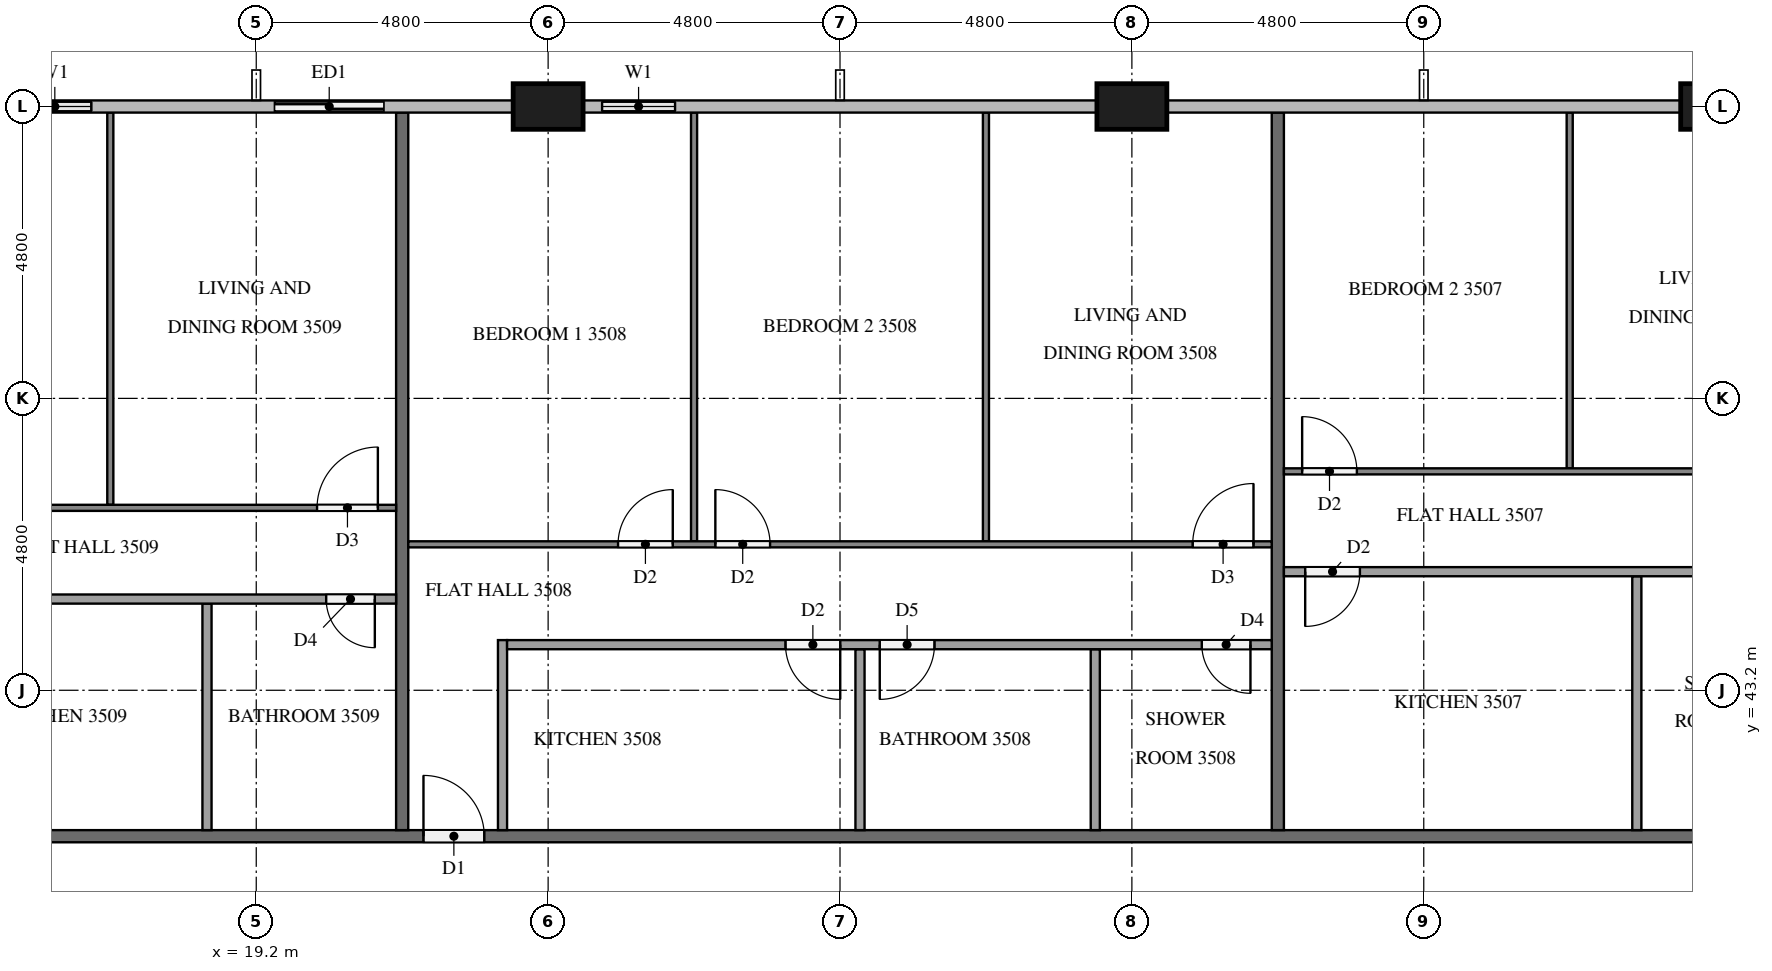
"""IFC4 building model, lengths in metres.
Left out: names, types, materials, properties, quantities, classifications, styles, units other than length and angle.
Written with IfcOpenShell. Run it as: python <this file> out.ifc"""

import sys

from ifc_helpers import new_model, si_unit, direction, frame, frame_2d, origin, origin_2d, place, context, subcontext, project, spatial, rectangle, extrude, element, fill, save


model = new_model("IFC4")
c1 = context("Model", 3, precision=1e-05, world=origin(), true_north=direction((0.0, 1.0)))
c2 = subcontext(c1, "Body", "Model", "MODEL_VIEW")
j1 = project(units=[si_unit("LENGTHUNIT", "METRE"), si_unit("PLANEANGLEUNIT", "RADIAN")], contexts=[c1])
p1 = place(None, origin())
s1 = spatial("IfcSite", under=j1, at=p1, CompositionType="ELEMENT")
p2 = place(p1, origin())
s2 = spatial("IfcBuilding", under=s1, at=p2, CompositionType="ELEMENT")
p3 = place(p2, frame((0.0, 0.0, 136.6)))
s3 = spatial("IfcBuildingStorey", under=s2, at=p3, CompositionType="ELEMENT", Elevation=136.6)
for number, where, z_axis, x_axis in (
    (1, (43.2, 52.8, 0.0), (0.0, 0.0, 1.0), (1.0, 0.0, 0.0)),
    (2, (33.6, 52.8, 0.0), (0.0, 0.0, 1.0), (1.0, 0.0, 0.0)),
    (3, (24.0, 52.8, 0.0), (0.0, 0.0, 1.0), (1.0, 0.0, 0.0)),
):
    element("IfcColumn", number, at=place(p3, frame(where, z_axis=z_axis, x_axis=x_axis)), inside=s3, PredefinedType="COLUMN", context=c2, shape_type="SweptSolid", body=[
        extrude(rectangle(XDim=1.15, YDim=0.75, at=origin_2d()), origin(), (0.0, 0.0, 1.0), 3.2),
    ])
p4 = place(p3, frame((26.4, 52.8, 0.0), z_axis=(0.0, 0.0, 1.0), x_axis=(-1.0, 0.0, 0.0)))
e4 = element("IfcWall", 4, at=p4, inside=s3, PredefinedType="SOLIDWALL", context=c2, shape_type="SweptSolid", body=[
    extrude(rectangle(XDim=1.825, YDim=0.15, at=frame_2d((0.913, 0.0))), origin(), (0.0, 0.0, 1.0), 3.2),
])
p5 = place(p4, frame((0.312, 0.0, 0.9)))
e5 = element("IfcOpeningElement", 5, at=p5, cuts=e4, PredefinedType="OPENING", context=c2, shape_type="SweptSolid", body=[
    extrude(rectangle(XDim=1.2, YDim=1.4, at=frame_2d((0.6, 0.7))), frame((0.0, 0.085, 0.0), z_axis=(0.0, -1.0, 0.0), x_axis=(1.0, 0.0, 0.0)), (0.0, 0.0, 1.0), 0.17),
])
p6 = place(p3, frame((21.6, 52.8, 0.0), z_axis=(0.0, 0.0, 1.0), x_axis=(-1.0, 0.0, 0.0)))
e6 = element("IfcWall", 6, at=p6, inside=s3, PredefinedType="SOLIDWALL", context=c2, shape_type="SweptSolid", body=[
    extrude(rectangle(XDim=2.4, YDim=0.15, at=frame_2d((1.2, 0.0))), origin(), (0.0, 0.0, 1.0), 3.2),
])
p7 = place(p6, frame((0.3, 0.0, 0.0)))
e7 = element("IfcOpeningElement", 7, at=p7, cuts=e6, PredefinedType="OPENING", context=c2, shape_type="SweptSolid", body=[
    extrude(rectangle(XDim=1.8, YDim=2.4, at=frame_2d((0.9, 1.2))), frame((0.0, 0.085, 0.0), z_axis=(0.0, -1.0, 0.0), x_axis=(1.0, 0.0, 0.0)), (0.0, 0.0, 1.0), 0.17),
])
p8 = place(p3, frame((16.8, 52.8, 0.0), z_axis=(0.0, 0.0, 1.0), x_axis=(-1.0, 0.0, 0.0)))
e8 = element("IfcWall", 8, at=p8, inside=s3, PredefinedType="SOLIDWALL", context=c2, shape_type="SweptSolid", body=[
    extrude(rectangle(XDim=1.825, YDim=0.15, at=frame_2d((0.913, 0.0))), origin(), (0.0, 0.0, 1.0), 3.2),
])
p9 = place(p8, frame((0.312, 0.0, 0.9)))
e9 = element("IfcOpeningElement", 9, at=p9, cuts=e8, PredefinedType="OPENING", context=c2, shape_type="SweptSolid", body=[
    extrude(rectangle(XDim=1.2, YDim=1.4, at=frame_2d((0.6, 0.7))), frame((0.0, 0.085, 0.0), z_axis=(0.0, -1.0, 0.0), x_axis=(1.0, 0.0, 0.0)), (0.0, 0.0, 1.0), 0.17),
])
p10 = place(p3, frame((11.9, 40.8, 0.0), z_axis=(0.0, 0.0, 1.0), x_axis=(1.0, 0.0, 0.0)))
e10 = element("IfcWall", 10, at=p10, inside=s3, PredefinedType="PARTITIONING", context=c2, shape_type="SweptSolid", body=[
    extrude(rectangle(XDim=38.6, YDim=0.2, at=frame_2d((19.3, 0.0))), origin(), (0.0, 0.0, 1.0), 3.2),
])
p11 = place(p10, frame((37.15, 0.0, 0.0)))
e11 = element("IfcOpeningElement", 11, at=p11, cuts=e10, PredefinedType="OPENING", context=c2, shape_type="SweptSolid", body=[
    extrude(rectangle(XDim=1.0, YDim=2.1, at=frame_2d((0.5, 1.05))), frame((0.0, 0.11, 0.0), z_axis=(0.0, -1.0, 0.0), x_axis=(1.0, 0.0, 0.0)), (0.0, 0.0, 1.0), 0.22),
])
p12 = place(p10, frame((10.05, 0.0, 0.0)))
e12 = element("IfcOpeningElement", 12, at=p12, cuts=e10, PredefinedType="OPENING", context=c2, shape_type="SweptSolid", body=[
    extrude(rectangle(XDim=1.0, YDim=2.1, at=frame_2d((0.5, 1.05))), frame((0.0, 0.11, 0.0), z_axis=(0.0, -1.0, 0.0), x_axis=(1.0, 0.0, 0.0)), (0.0, 0.0, 1.0), 0.22),
])
p13 = place(p10, frame((0.45, 0.0, 0.0)))
e13 = element("IfcOpeningElement", 13, at=p13, cuts=e10, PredefinedType="OPENING", context=c2, shape_type="SweptSolid", body=[
    extrude(rectangle(XDim=1.0, YDim=2.1, at=frame_2d((0.5, 1.05))), frame((0.0, 0.11, 0.0), z_axis=(0.0, -1.0, 0.0), x_axis=(1.0, 0.0, 0.0)), (0.0, 0.0, 1.0), 0.22),
])
for number, where, z_axis, x_axis in (
    (14, (36.0, 52.7, 0.0), (0.0, 0.0, 1.0), (0.0, -1.0, 0.0)),
    (15, (21.6, 52.7, 0.0), (0.0, 0.0, 1.0), (0.0, -1.0, 0.0)),
):
    element("IfcWall", number, at=place(p3, frame(where, z_axis=z_axis, x_axis=x_axis)), inside=s3, PredefinedType="PARTITIONING", context=c2, shape_type="SweptSolid", body=[
        extrude(rectangle(XDim=11.8, YDim=0.2, at=frame_2d((5.9, 0.0))), origin(), (0.0, 0.0, 1.0), 3.2),
    ])
p14 = place(p3, frame((40.8, 46.85, 0.0), z_axis=(0.0, 0.0, 1.0), x_axis=(0.0, 1.0, 0.0)))
e16 = element("IfcWall", 16, at=p14, inside=s3, PredefinedType="PARTITIONING", context=c2, shape_type="SweptSolid", body=[
    extrude(rectangle(XDim=5.85, YDim=0.1, at=frame_2d((2.925, 0.0))), origin(), (0.0, 0.0, 1.0), 3.2),
])
p15 = place(p3, frame((36.1, 46.8, 0.0), z_axis=(0.0, 0.0, 1.0), x_axis=(1.0, 0.0, 0.0)))
e17 = element("IfcWall", 17, at=p15, inside=s3, PredefinedType="PARTITIONING", context=c2, shape_type="SweptSolid", body=[
    extrude(rectangle(XDim=14.2, YDim=0.1, at=frame_2d((7.1, 0.0))), origin(), (0.0, 0.0, 1.0), 3.2),
])
p16 = place(p15, frame((9.85, 0.0, 0.0)))
e18 = element("IfcOpeningElement", 18, at=p16, cuts=e17, PredefinedType="OPENING", context=c2, shape_type="SweptSolid", body=[
    extrude(rectangle(XDim=0.9, YDim=2.1, at=frame_2d((0.45, 1.05))), frame((0.0, 0.06, 0.0), z_axis=(0.0, -1.0, 0.0), x_axis=(1.0, 0.0, 0.0)), (0.0, 0.0, 1.0), 0.12),
])
p17 = place(p15, frame((8.15, 0.0, 0.0)))
e19 = element("IfcOpeningElement", 19, at=p17, cuts=e17, PredefinedType="OPENING", context=c2, shape_type="SweptSolid", body=[
    extrude(rectangle(XDim=1.0, YDim=2.1, at=frame_2d((0.5, 1.05))), frame((0.0, 0.06, 0.0), z_axis=(0.0, -1.0, 0.0), x_axis=(1.0, 0.0, 0.0)), (0.0, 0.0, 1.0), 0.12),
])
p18 = place(p15, frame((0.3, 0.0, 0.0)))
e20 = element("IfcOpeningElement", 20, at=p18, cuts=e17, PredefinedType="OPENING", context=c2, shape_type="SweptSolid", body=[
    extrude(rectangle(XDim=0.9, YDim=2.1, at=frame_2d((0.45, 1.05))), frame((0.0, 0.06, 0.0), z_axis=(0.0, -1.0, 0.0), x_axis=(1.0, 0.0, 0.0)), (0.0, 0.0, 1.0), 0.12),
])
p19 = place(p3, frame((41.904, 40.9, 0.0), z_axis=(0.0, 0.0, 1.0), x_axis=(0.0, 1.0, 0.0)))
e21 = element("IfcWall", 21, at=p19, inside=s3, PredefinedType="PARTITIONING", context=c2, shape_type="SweptSolid", body=[
    extrude(rectangle(XDim=4.175, YDim=0.15, at=frame_2d((2.087, 0.0))), origin(), (0.0, 0.0, 1.0), 3.2),
])
p20 = place(p3, frame((48.675, 45.15, 0.0), z_axis=(0.0, 0.0, 1.0), x_axis=(-1.0, 0.0, 0.0)))
e22 = element("IfcWall", 22, at=p20, inside=s3, PredefinedType="PARTITIONING", context=c2, shape_type="SweptSolid", body=[
    extrude(rectangle(XDim=12.575, YDim=0.15, at=frame_2d((6.288, 0.0))), origin(), (0.0, 0.0, 1.0), 3.2),
])
p21 = place(p20, frame((2.644, 0.0, 0.0)))
e23 = element("IfcOpeningElement", 23, at=p21, cuts=e22, PredefinedType="OPENING", context=c2, shape_type="SweptSolid", body=[
    extrude(rectangle(XDim=0.9, YDim=2.1, at=frame_2d((0.45, 1.05))), frame((0.0, 0.085, 0.0), z_axis=(0.0, -1.0, 0.0), x_axis=(1.0, 0.0, 0.0)), (0.0, 0.0, 1.0), 0.17),
])
p22 = place(p20, frame((4.194, 0.0, 0.0)))
e24 = element("IfcOpeningElement", 24, at=p22, cuts=e22, PredefinedType="OPENING", context=c2, shape_type="SweptSolid", body=[
    extrude(rectangle(XDim=0.8, YDim=2.1, at=frame_2d((0.4, 1.05))), frame((0.0, 0.085, 0.0), z_axis=(0.0, -1.0, 0.0), x_axis=(1.0, 0.0, 0.0)), (0.0, 0.0, 1.0), 0.17),
])
p23 = place(p20, frame((11.325, 0.0, 0.0)))
e25 = element("IfcOpeningElement", 25, at=p23, cuts=e22, PredefinedType="OPENING", context=c2, shape_type="SweptSolid", body=[
    extrude(rectangle(XDim=0.9, YDim=2.1, at=frame_2d((0.45, 1.05))), frame((0.0, 0.085, 0.0), z_axis=(0.0, -1.0, 0.0), x_axis=(1.0, 0.0, 0.0)), (0.0, 0.0, 1.0), 0.17),
])
for number, where, z_axis, x_axis in (
    (26, (26.4, 45.65, 0.0), (0.0, 0.0, 1.0), (0.0, 1.0, 0.0)),
    (27, (31.2, 45.65, 0.0), (0.0, 0.0, 1.0), (0.0, 1.0, 0.0)),
):
    element("IfcWall", number, at=place(p3, frame(where, z_axis=z_axis, x_axis=x_axis)), inside=s3, PredefinedType="PARTITIONING", context=c2, shape_type="SweptSolid", body=[
        extrude(rectangle(XDim=7.05, YDim=0.1, at=frame_2d((3.525, 0.0))), origin(), (0.0, 0.0, 1.0), 3.2),
    ])
p24 = place(p3, frame((21.7, 45.6, 0.0), z_axis=(0.0, 0.0, 1.0), x_axis=(1.0, 0.0, 0.0)))
e28 = element("IfcWall", 28, at=p24, inside=s3, PredefinedType="PARTITIONING", context=c2, shape_type="SweptSolid", body=[
    extrude(rectangle(XDim=14.2, YDim=0.1, at=frame_2d((7.1, 0.0))), origin(), (0.0, 0.0, 1.0), 3.2),
])
p25 = place(p24, frame((3.45, 0.0, 0.0)))
e29 = element("IfcOpeningElement", 29, at=p25, cuts=e28, PredefinedType="OPENING", context=c2, shape_type="SweptSolid", body=[
    extrude(rectangle(XDim=0.9, YDim=2.1, at=frame_2d((0.45, 1.05))), frame((0.0, 0.06, 0.0), z_axis=(0.0, -1.0, 0.0), x_axis=(1.0, 0.0, 0.0)), (0.0, 0.0, 1.0), 0.12),
])
p26 = place(p24, frame((5.05, 0.0, 0.0)))
e30 = element("IfcOpeningElement", 30, at=p26, cuts=e28, PredefinedType="OPENING", context=c2, shape_type="SweptSolid", body=[
    extrude(rectangle(XDim=0.9, YDim=2.1, at=frame_2d((0.45, 1.05))), frame((0.0, 0.06, 0.0), z_axis=(0.0, -1.0, 0.0), x_axis=(1.0, 0.0, 0.0)), (0.0, 0.0, 1.0), 0.12),
])
p27 = place(p24, frame((12.9, 0.0, 0.0)))
e31 = element("IfcOpeningElement", 31, at=p27, cuts=e28, PredefinedType="OPENING", context=c2, shape_type="SweptSolid", body=[
    extrude(rectangle(XDim=1.0, YDim=2.1, at=frame_2d((0.5, 1.05))), frame((0.0, 0.06, 0.0), z_axis=(0.0, -1.0, 0.0), x_axis=(1.0, 0.0, 0.0)), (0.0, 0.0, 1.0), 0.12),
])
for number, where, z_axis, x_axis in (
    (32, (29.129, 40.9, 0.0), (0.0, 0.0, 1.0), (0.0, 1.0, 0.0)),
    (33, (32.998, 40.9, 0.0), (0.0, 0.0, 1.0), (0.0, 1.0, 0.0)),
):
    element("IfcWall", number, at=place(p3, frame(where, z_axis=z_axis, x_axis=x_axis)), inside=s3, PredefinedType="PARTITIONING", context=c2, shape_type="SweptSolid", body=[
        extrude(rectangle(XDim=2.975, YDim=0.15, at=frame_2d((1.488, 0.0))), origin(), (0.0, 0.0, 1.0), 3.2),
    ])
p28 = place(p3, frame((23.25, 40.9, 0.0), z_axis=(0.0, 0.0, 1.0), x_axis=(0.0, 1.0, 0.0)))
e34 = element("IfcWall", 34, at=p28, inside=s3, PredefinedType="PARTITIONING", context=c2, shape_type="SweptSolid", body=[
    extrude(rectangle(XDim=3.125, YDim=0.15, at=frame_2d((1.562, 0.0))), origin(), (0.0, 0.0, 1.0), 3.2),
])
p29 = place(p3, frame((35.9, 43.95, 0.0), z_axis=(0.0, 0.0, 1.0), x_axis=(-1.0, 0.0, 0.0)))
e35 = element("IfcWall", 35, at=p29, inside=s3, PredefinedType="PARTITIONING", context=c2, shape_type="SweptSolid", body=[
    extrude(rectangle(XDim=12.575, YDim=0.15, at=frame_2d((6.288, 0.0))), origin(), (0.0, 0.0, 1.0), 3.2),
])
p30 = place(p29, frame((7.096, 0.0, 0.0)))
e36 = element("IfcOpeningElement", 36, at=p30, cuts=e35, PredefinedType="OPENING", context=c2, shape_type="SweptSolid", body=[
    extrude(rectangle(XDim=0.9, YDim=2.1, at=frame_2d((0.45, 1.05))), frame((0.0, 0.085, 0.0), z_axis=(0.0, -1.0, 0.0), x_axis=(1.0, 0.0, 0.0)), (0.0, 0.0, 1.0), 0.17),
])
p31 = place(p29, frame((5.546, 0.0, 0.0)))
e37 = element("IfcOpeningElement", 37, at=p31, cuts=e35, PredefinedType="OPENING", context=c2, shape_type="SweptSolid", body=[
    extrude(rectangle(XDim=0.9, YDim=2.1, at=frame_2d((0.45, 1.05))), frame((0.0, 0.085, 0.0), z_axis=(0.0, -1.0, 0.0), x_axis=(1.0, 0.0, 0.0)), (0.0, 0.0, 1.0), 0.17),
])
p32 = place(p29, frame((0.35, 0.0, 0.0)))
e38 = element("IfcOpeningElement", 38, at=p32, cuts=e35, PredefinedType="OPENING", context=c2, shape_type="SweptSolid", body=[
    extrude(rectangle(XDim=0.8, YDim=2.1, at=frame_2d((0.4, 1.05))), frame((0.0, 0.085, 0.0), z_axis=(0.0, -1.0, 0.0), x_axis=(1.0, 0.0, 0.0)), (0.0, 0.0, 1.0), 0.17),
])
p33 = place(p3, frame((16.8, 46.25, 0.0), z_axis=(0.0, 0.0, 1.0), x_axis=(0.0, 1.0, 0.0)))
e39 = element("IfcWall", 39, at=p33, inside=s3, PredefinedType="PARTITIONING", context=c2, shape_type="SweptSolid", body=[
    extrude(rectangle(XDim=6.45, YDim=0.1, at=frame_2d((3.225, 0.0))), origin(), (0.0, 0.0, 1.0), 3.2),
])
p34 = place(p3, frame((12.1, 46.2, 0.0), z_axis=(0.0, 0.0, 1.0), x_axis=(1.0, 0.0, 0.0)))
e40 = element("IfcWall", 40, at=p34, inside=s3, PredefinedType="PARTITIONING", context=c2, shape_type="SweptSolid", body=[
    extrude(rectangle(XDim=9.4, YDim=0.1, at=frame_2d((4.7, 0.0))), origin(), (0.0, 0.0, 1.0), 3.2),
])
p35 = place(p34, frame((0.3, 0.0, 0.0)))
e41 = element("IfcOpeningElement", 41, at=p35, cuts=e40, PredefinedType="OPENING", context=c2, shape_type="SweptSolid", body=[
    extrude(rectangle(XDim=0.9, YDim=2.1, at=frame_2d((0.45, 1.05))), frame((0.0, 0.06, 0.0), z_axis=(0.0, -1.0, 0.0), x_axis=(1.0, 0.0, 0.0)), (0.0, 0.0, 1.0), 0.12),
])
p36 = place(p34, frame((8.1, 0.0, 0.0)))
e42 = element("IfcOpeningElement", 42, at=p36, cuts=e40, PredefinedType="OPENING", context=c2, shape_type="SweptSolid", body=[
    extrude(rectangle(XDim=1.0, YDim=2.1, at=frame_2d((0.5, 1.05))), frame((0.0, 0.06, 0.0), z_axis=(0.0, -1.0, 0.0), x_axis=(1.0, 0.0, 0.0)), (0.0, 0.0, 1.0), 0.12),
])
p37 = place(p3, frame((18.39, 40.9, 0.0), z_axis=(0.0, 0.0, 1.0), x_axis=(0.0, 1.0, 0.0)))
e43 = element("IfcWall", 43, at=p37, inside=s3, PredefinedType="PARTITIONING", context=c2, shape_type="SweptSolid", body=[
    extrude(rectangle(XDim=3.725, YDim=0.15, at=frame_2d((1.863, 0.0))), origin(), (0.0, 0.0, 1.0), 3.2),
])
p38 = place(p3, frame((21.5, 44.7, 0.0), z_axis=(0.0, 0.0, 1.0), x_axis=(-1.0, 0.0, 0.0)))
e44 = element("IfcWall", 44, at=p38, inside=s3, PredefinedType="PARTITIONING", context=c2, shape_type="SweptSolid", body=[
    extrude(rectangle(XDim=7.775, YDim=0.15, at=frame_2d((3.887, 0.0))), origin(), (0.0, 0.0, 1.0), 3.2),
])
p39 = place(p38, frame((6.575, 0.0, 0.0)))
e45 = element("IfcOpeningElement", 45, at=p39, cuts=e44, PredefinedType="OPENING", context=c2, shape_type="SweptSolid", body=[
    extrude(rectangle(XDim=0.9, YDim=2.1, at=frame_2d((0.45, 1.05))), frame((0.0, 0.085, 0.0), z_axis=(0.0, -1.0, 0.0), x_axis=(1.0, 0.0, 0.0)), (0.0, 0.0, 1.0), 0.17),
])
p40 = place(p38, frame((0.35, 0.0, 0.0)))
e46 = element("IfcOpeningElement", 46, at=p40, cuts=e44, PredefinedType="OPENING", context=c2, shape_type="SweptSolid", body=[
    extrude(rectangle(XDim=0.8, YDim=2.1, at=frame_2d((0.4, 1.05))), frame((0.0, 0.085, 0.0), z_axis=(0.0, -1.0, 0.0), x_axis=(1.0, 0.0, 0.0)), (0.0, 0.0, 1.0), 0.17),
])
p41 = place(p5, origin())
e47 = element("IfcWindow", 47, at=p41, inside=s3, PartitioningType="SINGLE_PANEL", PredefinedType="WINDOW", context=c2, shape_type="SweptSolid", body=[
    extrude(rectangle(XDim=1.2, YDim=1.4, at=frame_2d((0.6, 0.7))), frame((0.0, 0.03, 0.0), z_axis=(0.0, -1.0, 0.0), x_axis=(1.0, 0.0, 0.0)), (0.0, 0.0, 1.0), 0.06),
])
fill(e5, e47)
p42 = place(p7, origin())
e48 = element("IfcDoor", 48, at=p42, inside=s3, OperationType="SLIDING_TO_RIGHT", PredefinedType="DOOR", context=c2, shape_type="SweptSolid", body=[
    extrude(rectangle(XDim=1.8, YDim=2.4, at=frame_2d((0.9, 1.2))), frame((0.0, 0.025, 0.0), z_axis=(0.0, -1.0, 0.0), x_axis=(1.0, 0.0, 0.0)), (0.0, 0.0, 1.0), 0.05),
])
fill(e7, e48)
p43 = place(p9, origin())
e49 = element("IfcWindow", 49, at=p43, inside=s3, PartitioningType="SINGLE_PANEL", PredefinedType="WINDOW", context=c2, shape_type="SweptSolid", body=[
    extrude(rectangle(XDim=1.2, YDim=1.4, at=frame_2d((0.6, 0.7))), frame((0.0, 0.03, 0.0), z_axis=(0.0, -1.0, 0.0), x_axis=(1.0, 0.0, 0.0)), (0.0, 0.0, 1.0), 0.06),
])
fill(e9, e49)
p44 = place(p12, origin())
e50 = element("IfcDoor", 50, at=p44, inside=s3, OperationType="SINGLE_SWING_LEFT", PredefinedType="DOOR", context=c2, shape_type="SweptSolid", body=[
    extrude(rectangle(XDim=1.0, YDim=2.1, at=frame_2d((0.5, 1.05))), frame((0.0, 0.025, 0.0), z_axis=(0.0, -1.0, 0.0), x_axis=(1.0, 0.0, 0.0)), (0.0, 0.0, 1.0), 0.05),
])
fill(e12, e50)
p45 = place(p18, origin())
e51 = element("IfcDoor", 51, at=p45, inside=s3, OperationType="SINGLE_SWING_LEFT", PredefinedType="DOOR", context=c2, shape_type="SweptSolid", body=[
    extrude(rectangle(XDim=0.9, YDim=2.1, at=frame_2d((0.45, 1.05))), frame((0.0, 0.025, 0.0), z_axis=(0.0, -1.0, 0.0), x_axis=(1.0, 0.0, 0.0)), (0.0, 0.0, 1.0), 0.05),
])
fill(e20, e51)
p46 = place(p23, origin())
e52 = element("IfcDoor", 52, at=p46, inside=s3, OperationType="SINGLE_SWING_RIGHT", PredefinedType="DOOR", context=c2, shape_type="SweptSolid", body=[
    extrude(rectangle(XDim=0.9, YDim=2.1, at=frame_2d((0.45, 1.05))), frame((0.0, 0.025, 0.0), z_axis=(0.0, -1.0, 0.0), x_axis=(1.0, 0.0, 0.0)), (0.0, 0.0, 1.0), 0.05),
])
fill(e25, e52)
p47 = place(p25, origin())
e53 = element("IfcDoor", 53, at=p47, inside=s3, OperationType="SINGLE_SWING_RIGHT", PredefinedType="DOOR", context=c2, shape_type="SweptSolid", body=[
    extrude(rectangle(XDim=0.9, YDim=2.1, at=frame_2d((0.45, 1.05))), frame((0.0, 0.025, 0.0), z_axis=(0.0, -1.0, 0.0), x_axis=(1.0, 0.0, 0.0)), (0.0, 0.0, 1.0), 0.05),
])
fill(e29, e53)
p48 = place(p26, origin())
e54 = element("IfcDoor", 54, at=p48, inside=s3, OperationType="SINGLE_SWING_LEFT", PredefinedType="DOOR", context=c2, shape_type="SweptSolid", body=[
    extrude(rectangle(XDim=0.9, YDim=2.1, at=frame_2d((0.45, 1.05))), frame((0.0, 0.025, 0.0), z_axis=(0.0, -1.0, 0.0), x_axis=(1.0, 0.0, 0.0)), (0.0, 0.0, 1.0), 0.05),
])
fill(e30, e54)
p49 = place(p27, origin())
e55 = element("IfcDoor", 55, at=p49, inside=s3, OperationType="SINGLE_SWING_RIGHT", PredefinedType="DOOR", context=c2, shape_type="SweptSolid", body=[
    extrude(rectangle(XDim=1.0, YDim=2.1, at=frame_2d((0.5, 1.05))), frame((0.0, 0.025, 0.0), z_axis=(0.0, -1.0, 0.0), x_axis=(1.0, 0.0, 0.0)), (0.0, 0.0, 1.0), 0.05),
])
fill(e31, e55)
p50 = place(p30, origin())
e56 = element("IfcDoor", 56, at=p50, inside=s3, OperationType="SINGLE_SWING_LEFT", PredefinedType="DOOR", context=c2, shape_type="SweptSolid", body=[
    extrude(rectangle(XDim=0.9, YDim=2.1, at=frame_2d((0.45, 1.05))), frame((0.0, 0.025, 0.0), z_axis=(0.0, -1.0, 0.0), x_axis=(1.0, 0.0, 0.0)), (0.0, 0.0, 1.0), 0.05),
])
fill(e36, e56)
p51 = place(p31, origin())
e57 = element("IfcDoor", 57, at=p51, inside=s3, OperationType="SINGLE_SWING_RIGHT", PredefinedType="DOOR", context=c2, shape_type="SweptSolid", body=[
    extrude(rectangle(XDim=0.9, YDim=2.1, at=frame_2d((0.45, 1.05))), frame((0.0, 0.025, 0.0), z_axis=(0.0, -1.0, 0.0), x_axis=(1.0, 0.0, 0.0)), (0.0, 0.0, 1.0), 0.05),
])
fill(e37, e57)
p52 = place(p32, origin())
e58 = element("IfcDoor", 58, at=p52, inside=s3, OperationType="SINGLE_SWING_LEFT", PredefinedType="DOOR", context=c2, shape_type="SweptSolid", body=[
    extrude(rectangle(XDim=0.8, YDim=2.1, at=frame_2d((0.4, 1.05))), frame((0.0, 0.025, 0.0), z_axis=(0.0, -1.0, 0.0), x_axis=(1.0, 0.0, 0.0)), (0.0, 0.0, 1.0), 0.05),
])
fill(e38, e58)
p53 = place(p36, origin())
e59 = element("IfcDoor", 59, at=p53, inside=s3, OperationType="SINGLE_SWING_RIGHT", PredefinedType="DOOR", context=c2, shape_type="SweptSolid", body=[
    extrude(rectangle(XDim=1.0, YDim=2.1, at=frame_2d((0.5, 1.05))), frame((0.0, 0.025, 0.0), z_axis=(0.0, -1.0, 0.0), x_axis=(1.0, 0.0, 0.0)), (0.0, 0.0, 1.0), 0.05),
])
fill(e42, e59)
p54 = place(p40, origin())
e60 = element("IfcDoor", 60, at=p54, inside=s3, OperationType="SINGLE_SWING_LEFT", PredefinedType="DOOR", context=c2, shape_type="SweptSolid", body=[
    extrude(rectangle(XDim=0.8, YDim=2.1, at=frame_2d((0.4, 1.05))), frame((0.0, 0.025, 0.0), z_axis=(0.0, -1.0, 0.0), x_axis=(1.0, 0.0, 0.0)), (0.0, 0.0, 1.0), 0.05),
])
fill(e46, e60)
save(model, sys.argv[1])
